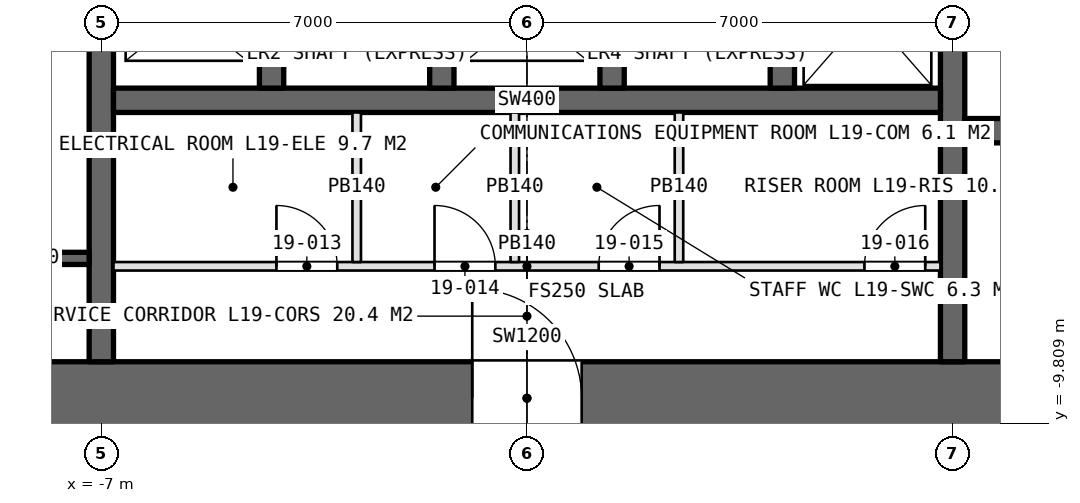
"""IFC4 building model, lengths in metres.
Left out: names, types, materials, properties, quantities, classifications, styles, units other than length and angle.
Written with IfcOpenShell. Run it as: python <this file> out.ifc"""

import sys

from ifc_helpers import new_model, si_unit, direction, frame, frame_2d, origin, place, context, subcontext, project, spatial, rectangle, extrude, element, fill, save


model = new_model("IFC4")
c1 = context("Model", 3, precision=1e-05, world=origin(), true_north=direction((0.0, 1.0)))
c2 = subcontext(c1, "Body", "Model", "MODEL_VIEW")
j1 = project(units=[si_unit("LENGTHUNIT", "METRE"), si_unit("PLANEANGLEUNIT", "RADIAN")], contexts=[c1])
p1 = place(None, origin())
s1 = spatial("IfcSite", under=j1, at=p1, CompositionType="ELEMENT")
p2 = place(p1, origin())
s2 = spatial("IfcBuilding", under=s1, at=p2, CompositionType="ELEMENT")
p3 = place(p2, frame((0.0, 0.0, 95.0)))
s3 = spatial("IfcBuildingStorey", under=s2, at=p3, CompositionType="ELEMENT", Elevation=95.0)
p4 = place(p3, frame((-14.0, -9.4, 0.0), z_axis=(0.0, 0.0, 1.0), x_axis=(1.0, 0.0, 0.0)))
e1 = element("IfcWall", 1, at=p4, inside=s3, PredefinedType="SHEAR", context=c2, shape_type="SweptSolid", body=[
    extrude(rectangle(XDim=28.0, YDim=1.2, at=frame_2d((14.0, 0.0))), origin(), (0.0, 0.0, 1.0), 5.0),
])
p5 = place(p4, frame((13.1, 0.0, 0.0)))
e2 = element("IfcOpeningElement", 2, at=p5, cuts=e1, PredefinedType="OPENING", context=c2, shape_type="SweptSolid", body=[
    extrude(rectangle(XDim=1.8, YDim=2.4, at=frame_2d((0.9, 1.2))), frame((0.0, 0.61, 0.0), z_axis=(0.0, -1.0, 0.0), x_axis=(1.0, 0.0, 0.0)), (0.0, 0.0, 1.0), 1.22),
])
p6 = place(p4, frame((22.9, 0.0, 0.0)))
e3 = element("IfcOpeningElement", 3, at=p6, cuts=e1, PredefinedType="OPENING", context=c2, shape_type="SweptSolid", body=[
    extrude(rectangle(XDim=2.2, YDim=2.7, at=frame_2d((1.1, 1.35))), frame((0.0, 0.61, 0.0), z_axis=(0.0, -1.0, 0.0), x_axis=(1.0, 0.0, 0.0)), (0.0, 0.0, 1.0), 1.22),
])
p7 = place(p3, frame((-7.0, -8.8, 0.0), z_axis=(0.0, 0.0, 1.0), x_axis=(0.0, 1.0, 0.0)))
e4 = element("IfcWall", 4, at=p7, inside=s3, PredefinedType="SHEAR", context=c2, shape_type="SweptSolid", body=[
    extrude(rectangle(XDim=17.6, YDim=0.4, at=frame_2d((8.8, 0.0))), origin(), (0.0, 0.0, 1.0), 5.0),
])
p8 = place(p7, frame((7.9, 0.0, 0.0)))
e5 = element("IfcOpeningElement", 5, at=p8, cuts=e4, PredefinedType="OPENING", context=c2, shape_type="SweptSolid", body=[
    extrude(rectangle(XDim=1.8, YDim=2.4, at=frame_2d((0.9, 1.2))), frame((0.0, 0.21, 0.0), z_axis=(0.0, -1.0, 0.0), x_axis=(1.0, 0.0, 0.0)), (0.0, 0.0, 1.0), 0.42),
])
p9 = place(p3, frame((7.0, -8.8, 0.0), z_axis=(0.0, 0.0, 1.0), x_axis=(0.0, 1.0, 0.0)))
e6 = element("IfcWall", 6, at=p9, inside=s3, PredefinedType="SHEAR", context=c2, shape_type="SweptSolid", body=[
    extrude(rectangle(XDim=17.6, YDim=0.4, at=frame_2d((8.8, 0.0))), origin(), (0.0, 0.0, 1.0), 5.0),
])
p10 = place(p9, frame((7.9, 0.0, 0.0)))
e7 = element("IfcOpeningElement", 7, at=p10, cuts=e6, PredefinedType="OPENING", context=c2, shape_type="SweptSolid", body=[
    extrude(rectangle(XDim=1.8, YDim=2.4, at=frame_2d((0.9, 1.2))), frame((0.0, 0.21, 0.0), z_axis=(0.0, -1.0, 0.0), x_axis=(1.0, 0.0, 0.0)), (0.0, 0.0, 1.0), 0.42),
])
p11 = place(p3, frame((-6.8, -4.5, 0.0), z_axis=(0.0, 0.0, 1.0), x_axis=(1.0, 0.0, 0.0)))
e8 = element("IfcWall", 8, at=p11, inside=s3, PredefinedType="SHEAR", context=c2, shape_type="SweptSolid", body=[
    extrude(rectangle(XDim=13.6, YDim=0.4, at=frame_2d((6.8, 0.0))), origin(), (0.0, 0.0, 1.0), 5.0),
])
p12 = place(p3, frame((7.2, -5.0, 0.0), z_axis=(0.0, 0.0, 1.0), x_axis=(1.0, 0.0, 0.0)))
e9 = element("IfcWall", 9, at=p12, inside=s3, PredefinedType="SHEAR", context=c2, shape_type="SweptSolid", body=[
    extrude(rectangle(XDim=5.6, YDim=0.4, at=frame_2d((2.8, 0.0))), origin(), (0.0, 0.0, 1.0), 5.0),
])
for number, where, z_axis, x_axis in (
    (10, (-4.2, -4.3, 0.0), (0.0, 0.0, 1.0), (0.0, 1.0, 0.0)),
    (11, (-1.4, -4.3, 0.0), (0.0, 0.0, 1.0), (0.0, 1.0, 0.0)),
    (12, (1.4, -4.3, 0.0), (0.0, 0.0, 1.0), (0.0, 1.0, 0.0)),
    (13, (4.2, -4.3, 0.0), (0.0, 0.0, 1.0), (0.0, 1.0, 0.0)),
):
    element("IfcWall", number, at=place(p3, frame(where, z_axis=z_axis, x_axis=x_axis)), inside=s3, PredefinedType="SHEAR", context=c2, shape_type="SweptSolid", body=[
        extrude(rectangle(XDim=2.5, YDim=0.4, at=frame_2d((1.25, 0.0))), origin(), (0.0, 0.0, 1.0), 5.0),
    ])
p13 = place(p3, frame((-6.8, -7.23, 0.0), z_axis=(0.0, 0.0, 1.0), x_axis=(1.0, 0.0, 0.0)))
e14 = element("IfcWall", 14, at=p13, inside=s3, PredefinedType="PARTITIONING", context=c2, shape_type="SweptSolid", body=[
    extrude(rectangle(XDim=13.6, YDim=0.14, at=frame_2d((6.8, 0.0))), origin(), (0.0, 0.0, 1.0), 4.75),
])
p14 = place(p13, frame((2.68, 0.0, 0.0)))
e15 = element("IfcOpeningElement", 15, at=p14, cuts=e14, PredefinedType="OPENING", context=c2, shape_type="SweptSolid", body=[
    extrude(rectangle(XDim=1.0, YDim=2.4, at=frame_2d((0.5, 1.2))), frame((0.0, 0.08, 0.0), z_axis=(0.0, -1.0, 0.0), x_axis=(1.0, 0.0, 0.0)), (0.0, 0.0, 1.0), 0.16),
])
p15 = place(p13, frame((5.28, 0.0, 0.0)))
e16 = element("IfcOpeningElement", 16, at=p15, cuts=e14, PredefinedType="OPENING", context=c2, shape_type="SweptSolid", body=[
    extrude(rectangle(XDim=1.0, YDim=2.4, at=frame_2d((0.5, 1.2))), frame((0.0, 0.08, 0.0), z_axis=(0.0, -1.0, 0.0), x_axis=(1.0, 0.0, 0.0)), (0.0, 0.0, 1.0), 0.16),
])
p16 = place(p13, frame((7.98, 0.0, 0.0)))
e17 = element("IfcOpeningElement", 17, at=p16, cuts=e14, PredefinedType="OPENING", context=c2, shape_type="SweptSolid", body=[
    extrude(rectangle(XDim=1.0, YDim=2.4, at=frame_2d((0.5, 1.2))), frame((0.0, 0.08, 0.0), z_axis=(0.0, -1.0, 0.0), x_axis=(1.0, 0.0, 0.0)), (0.0, 0.0, 1.0), 0.16),
])
p17 = place(p13, frame((12.35, 0.0, 0.0)))
e18 = element("IfcOpeningElement", 18, at=p17, cuts=e14, PredefinedType="OPENING", context=c2, shape_type="SweptSolid", body=[
    extrude(rectangle(XDim=1.0, YDim=2.4, at=frame_2d((0.5, 1.2))), frame((0.0, 0.08, 0.0), z_axis=(0.0, -1.0, 0.0), x_axis=(1.0, 0.0, 0.0)), (0.0, 0.0, 1.0), 0.16),
])
for number, where, z_axis, x_axis in (
    (19, (-2.8, -4.7, 0.0), (0.0, 0.0, 1.0), (0.0, -1.0, 0.0)),
    (20, (-0.2, -4.7, 0.0), (0.0, 0.0, 1.0), (0.0, -1.0, 0.0)),
    (21, (2.5, -4.7, 0.0), (0.0, 0.0, 1.0), (0.0, -1.0, 0.0)),
):
    element("IfcWall", number, at=place(p3, frame(where, z_axis=z_axis, x_axis=x_axis)), inside=s3, PredefinedType="PARTITIONING", context=c2, shape_type="SweptSolid", body=[
        extrude(rectangle(XDim=2.46, YDim=0.14, at=frame_2d((1.23, 0.0))), origin(), (0.0, 0.0, 1.0), 4.75),
    ])
p18 = place(p3, frame((-9.15, -7.1, 0.0), z_axis=(0.0, 0.0, 1.0), x_axis=(1.0, 0.0, 0.0)))
e22 = element("IfcWall", 22, at=p18, inside=s3, PredefinedType="SOLIDWALL", context=c2, shape_type="SweptSolid", body=[
    extrude(rectangle(XDim=1.95, YDim=0.2, at=frame_2d((0.975, 0.0))), origin(), (0.0, 0.0, 1.0), 5.0),
])
p19 = place(p14, origin())
e23 = element("IfcDoor", 23, at=p19, inside=s3, OperationType="SINGLE_SWING_LEFT", PredefinedType="DOOR", context=c2, shape_type="SweptSolid", body=[
    extrude(rectangle(XDim=1.0, YDim=2.4, at=frame_2d((0.5, 1.2))), frame((0.0, 0.025, 0.0), z_axis=(0.0, -1.0, 0.0), x_axis=(1.0, 0.0, 0.0)), (0.0, 0.0, 1.0), 0.05),
])
fill(e15, e23)
p20 = place(p15, origin())
e24 = element("IfcDoor", 24, at=p20, inside=s3, OperationType="SINGLE_SWING_LEFT", PredefinedType="DOOR", context=c2, shape_type="SweptSolid", body=[
    extrude(rectangle(XDim=1.0, YDim=2.4, at=frame_2d((0.5, 1.2))), frame((0.0, 0.025, 0.0), z_axis=(0.0, -1.0, 0.0), x_axis=(1.0, 0.0, 0.0)), (0.0, 0.0, 1.0), 0.05),
])
fill(e16, e24)
p21 = place(p16, origin())
e25 = element("IfcDoor", 25, at=p21, inside=s3, OperationType="SINGLE_SWING_RIGHT", PredefinedType="DOOR", context=c2, shape_type="SweptSolid", body=[
    extrude(rectangle(XDim=1.0, YDim=2.4, at=frame_2d((0.5, 1.2))), frame((0.0, 0.025, 0.0), z_axis=(0.0, -1.0, 0.0), x_axis=(1.0, 0.0, 0.0)), (0.0, 0.0, 1.0), 0.05),
])
fill(e17, e25)
p22 = place(p17, origin())
e26 = element("IfcDoor", 26, at=p22, inside=s3, OperationType="SINGLE_SWING_RIGHT", PredefinedType="DOOR", context=c2, shape_type="SweptSolid", body=[
    extrude(rectangle(XDim=1.0, YDim=2.4, at=frame_2d((0.5, 1.2))), frame((0.0, 0.025, 0.0), z_axis=(0.0, -1.0, 0.0), x_axis=(1.0, 0.0, 0.0)), (0.0, 0.0, 1.0), 0.05),
])
fill(e18, e26)
p23 = place(p5, origin())
e27 = element("IfcDoor", 27, at=p23, inside=s3, OperationType="DOUBLE_DOOR_SINGLE_SWING", PredefinedType="DOOR", context=c2, shape_type="SweptSolid", body=[
    extrude(rectangle(XDim=1.8, YDim=2.4, at=frame_2d((0.9, 1.2))), frame((0.0, 0.025, 0.0), z_axis=(0.0, -1.0, 0.0), x_axis=(1.0, 0.0, 0.0)), (0.0, 0.0, 1.0), 0.05),
])
fill(e2, e27)
save(model, sys.argv[1])
